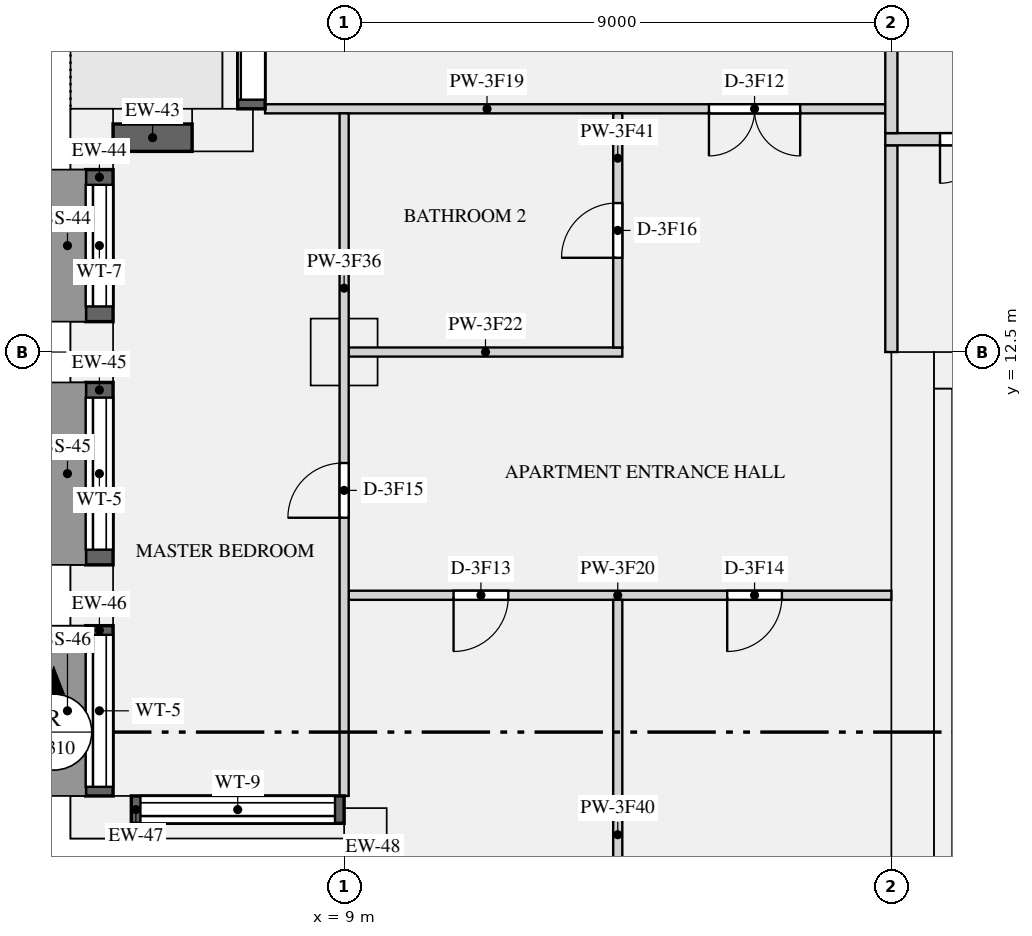
"""IFC4 building model, lengths in metres.
Left out: names, types, materials, properties, quantities, classifications, styles, units other than length and angle.
Written with IfcOpenShell. Run it as: python <this file> out.ifc"""

import sys

from ifc_helpers import new_model, si_unit, direction, frame, frame_2d, origin, origin_2d, place, context, subcontext, project, spatial, rectangle, extrude, element, fill, save


model = new_model("IFC4")
c1 = context("Model", 3, precision=1e-05, world=origin(), true_north=direction((0.0, 1.0)))
c2 = subcontext(c1, "Body", "Model", "MODEL_VIEW")
j1 = project(units=[si_unit("LENGTHUNIT", "METRE"), si_unit("PLANEANGLEUNIT", "RADIAN")], contexts=[c1])
p1 = place(None, origin())
s1 = spatial("IfcSite", under=j1, at=p1, CompositionType="ELEMENT")
p2 = place(p1, origin())
s2 = spatial("IfcBuilding", under=s1, at=p2, CompositionType="ELEMENT")
p3 = place(p2, frame((0.0, 0.0, 182.25)))
s3 = spatial("IfcBuildingStorey", under=s2, at=p3, CompositionType="ELEMENT", Elevation=182.25)
for number, where, z_axis, x_axis in (
    (1, (7.0, 16.15, 0.0), (0.0, 0.0, 1.0), (-1.0, 0.0, 0.0)),
    (2, (4.85, 16.0, 0.0), (0.0, 0.0, 1.0), (0.0, -1.0, 0.0)),
    (3, (4.85, 12.5, 0.0), (0.0, 0.0, 1.0), (0.0, -1.0, 0.0)),
    (4, (4.85, 8.5, 0.0), (0.0, 0.0, 1.0), (0.0, -1.0, 0.0)),
):
    element("IfcColumn", number, at=place(p3, frame(where, z_axis=z_axis, x_axis=x_axis)), inside=s3, PredefinedType="USERDEFINED", context=c2, shape_type="SweptSolid", body=[
        extrude(rectangle(XDim=1.0, YDim=0.7, at=origin_2d()), origin(), (0.0, 0.0, 1.0), 2.65),
    ])
for number, where, z_axis, x_axis in (
    (5, (5.0, 4.85, 0.0), (0.0, 0.0, 1.0), (1.0, 0.0, 0.0)),
    (6, (9.35, 4.5, 0.0), (0.0, 0.0, 1.0), (0.0, -1.0, 0.0)),
):
    element("IfcColumn", number, at=place(p3, frame(where, z_axis=z_axis, x_axis=x_axis)), inside=s3, PredefinedType="USERDEFINED", context=c2, shape_type="SweptSolid", body=[
        extrude(rectangle(XDim=1.0, YDim=0.7, at=origin_2d()), origin(), (0.0, 0.0, 1.0), 3.15),
    ])
p4 = place(p3, frame((9.0, 12.5, 0.0), z_axis=(0.0, 0.0, 1.0), x_axis=(1.0, 0.0, 0.0)))
e7 = element("IfcColumn", 7, at=p4, inside=s3, PredefinedType="COLUMN", context=c2, shape_type="SweptSolid", body=[
    extrude(rectangle(XDim=1.1, YDim=1.1, at=origin_2d()), origin(), (0.0, 0.0, 1.0), 3.15),
])
p5 = place(p3, frame((18.35, 0.0, 0.0), z_axis=(0.0, 0.0, 1.0), x_axis=(0.0, 1.0, 0.0)))
e8 = element("IfcWall", 8, at=p5, inside=s3, PredefinedType="SHEAR", context=c2, shape_type="SweptSolid", body=[
    extrude(rectangle(XDim=12.5, YDim=0.7, at=frame_2d((6.25, 0.0))), origin(), (0.0, 0.0, 1.0), 3.15),
])
p6 = place(p3, frame((18.7, 12.2, 0.0), z_axis=(0.0, 0.0, 1.0), x_axis=(1.0, 0.0, 0.0)))
e9 = element("IfcWall", 9, at=p6, inside=s3, PredefinedType="SHEAR", context=c2, shape_type="SweptSolid", body=[
    extrude(rectangle(XDim=34.6, YDim=0.6, at=frame_2d((17.3, 0.0))), origin(), (0.0, 0.0, 1.0), 3.15),
])
p7 = place(p6, frame((24.475, 0.0, 0.0)))
e10 = element("IfcOpeningElement", 10, at=p7, cuts=e9, PredefinedType="OPENING", context=c2, shape_type="SweptSolid", body=[
    extrude(rectangle(XDim=1.1, YDim=2.1, at=frame_2d((0.55, 1.05))), frame((0.0, 0.31, 0.0), z_axis=(0.0, -1.0, 0.0), x_axis=(1.0, 0.0, 0.0)), (0.0, 0.0, 1.0), 0.62),
])
p8 = place(p6, frame((26.725, 0.0, 0.0)))
e11 = element("IfcOpeningElement", 11, at=p8, cuts=e9, PredefinedType="OPENING", context=c2, shape_type="SweptSolid", body=[
    extrude(rectangle(XDim=1.1, YDim=2.1, at=frame_2d((0.55, 1.05))), frame((0.0, 0.31, 0.0), z_axis=(0.0, -1.0, 0.0), x_axis=(1.0, 0.0, 0.0)), (0.0, 0.0, 1.0), 0.62),
])
p9 = place(p6, frame((28.975, 0.0, 0.0)))
e12 = element("IfcOpeningElement", 12, at=p9, cuts=e9, PredefinedType="OPENING", context=c2, shape_type="SweptSolid", body=[
    extrude(rectangle(XDim=1.1, YDim=2.1, at=frame_2d((0.55, 1.05))), frame((0.0, 0.31, 0.0), z_axis=(0.0, -1.0, 0.0), x_axis=(1.0, 0.0, 0.0)), (0.0, 0.0, 1.0), 0.62),
])
p10 = place(p6, frame((4.85, 0.0, 0.0)))
e13 = element("IfcOpeningElement", 13, at=p10, cuts=e9, PredefinedType="OPENING", context=c2, shape_type="SweptSolid", body=[
    extrude(rectangle(XDim=0.9, YDim=2.1, at=frame_2d((0.45, 1.05))), frame((0.0, 0.31, 0.0), z_axis=(0.0, -1.0, 0.0), x_axis=(1.0, 0.0, 0.0)), (0.0, 0.0, 1.0), 0.62),
])
p11 = place(p6, frame((11.85, 0.0, 0.0)))
e14 = element("IfcOpeningElement", 14, at=p11, cuts=e9, PredefinedType="OPENING", context=c2, shape_type="SweptSolid", body=[
    extrude(rectangle(XDim=0.9, YDim=2.1, at=frame_2d((0.45, 1.05))), frame((0.0, 0.31, 0.0), z_axis=(0.0, -1.0, 0.0), x_axis=(1.0, 0.0, 0.0)), (0.0, 0.0, 1.0), 0.62),
])
p12 = place(p6, frame((18.35, 0.0, 0.0)))
e15 = element("IfcOpeningElement", 15, at=p12, cuts=e9, PredefinedType="OPENING", context=c2, shape_type="SweptSolid", body=[
    extrude(rectangle(XDim=0.9, YDim=2.1, at=frame_2d((0.45, 1.05))), frame((0.0, 0.31, 0.0), z_axis=(0.0, -1.0, 0.0), x_axis=(1.0, 0.0, 0.0)), (0.0, 0.0, 1.0), 0.62),
])
p13 = place(p6, frame((1.45, 0.0, 0.0)))
e16 = element("IfcOpeningElement", 16, at=p13, cuts=e9, PredefinedType="OPENING", context=c2, shape_type="SweptSolid", body=[
    extrude(rectangle(XDim=1.2, YDim=2.1, at=frame_2d((0.6, 1.05))), frame((0.0, 0.31, 0.0), z_axis=(0.0, -1.0, 0.0), x_axis=(1.0, 0.0, 0.0)), (0.0, 0.0, 1.0), 0.62),
])
p14 = place(p6, frame((31.95, 0.0, 0.0)))
e17 = element("IfcOpeningElement", 17, at=p14, cuts=e9, PredefinedType="OPENING", context=c2, shape_type="SweptSolid", body=[
    extrude(rectangle(XDim=1.2, YDim=2.1, at=frame_2d((0.6, 1.05))), frame((0.0, 0.31, 0.0), z_axis=(0.0, -1.0, 0.0), x_axis=(1.0, 0.0, 0.0)), (0.0, 0.0, 1.0), 0.62),
])
p15 = place(p3, frame((18.85, 1.0, 0.0), z_axis=(0.0, 0.0, 1.0), x_axis=(0.0, 1.0, 0.0)))
e18 = element("IfcWall", 18, at=p15, inside=s3, PredefinedType="SHEAR", context=c2, shape_type="SweptSolid", body=[
    extrude(rectangle(XDim=10.9, YDim=0.3, at=frame_2d((5.45, 0.0))), origin(), (0.0, 0.0, 1.0), 3.15),
])
p16 = place(p3, frame((7.475, 20.0, 0.0), z_axis=(0.0, 0.0, 1.0), x_axis=(0.0, -1.0, 0.0)))
e19 = element("IfcWall", 19, at=p16, inside=s3, PredefinedType="SOLIDWALL", context=c2, shape_type="SweptSolid", body=[
    extrude(rectangle(XDim=3.5, YDim=0.45, at=frame_2d((1.75, 0.0))), origin(), (0.0, 0.0, 1.0), 2.65),
])
p17 = place(p16, frame((0.15, 0.0, 0.0)))
e20 = element("IfcOpeningElement", 20, at=p17, cuts=e19, PredefinedType="OPENING", context=c2, shape_type="SweptSolid", body=[
    extrude(rectangle(XDim=3.2, YDim=2.3, at=frame_2d((1.6, 1.15))), frame((0.0, 0.235, 0.0), z_axis=(0.0, -1.0, 0.0), x_axis=(1.0, 0.0, 0.0)), (0.0, 0.0, 1.0), 0.47),
])
p18 = place(p3, frame((6.5, 16.025, 0.9), z_axis=(0.0, 0.0, 1.0), x_axis=(-1.0, 0.0, 0.0)))
e21 = element("IfcWall", 21, at=p18, inside=s3, PredefinedType="SOLIDWALL", context=c2, shape_type="SweptSolid", body=[
    extrude(rectangle(XDim=1.3, YDim=0.45, at=frame_2d((0.65, 0.0))), origin(), (0.0, 0.0, 1.0), 1.75),
])
p19 = place(p3, frame((4.975, 15.5, 0.9), z_axis=(0.0, 0.0, 1.0), x_axis=(0.0, -1.0, 0.0)))
e22 = element("IfcWall", 22, at=p19, inside=s3, PredefinedType="SOLIDWALL", context=c2, shape_type="SweptSolid", body=[
    extrude(rectangle(XDim=2.5, YDim=0.45, at=frame_2d((1.25, 0.0))), origin(), (0.0, 0.0, 1.0), 1.75),
])
p20 = place(p19, frame((0.25, 0.0, 0.15)))
e23 = element("IfcOpeningElement", 23, at=p20, cuts=e22, PredefinedType="OPENING", context=c2, shape_type="SweptSolid", body=[
    extrude(rectangle(XDim=2.0, YDim=1.5, at=frame_2d((1.0, 0.75))), frame((0.0, 0.235, 0.0), z_axis=(0.0, -1.0, 0.0), x_axis=(1.0, 0.0, 0.0)), (0.0, 0.0, 1.0), 0.47),
])
p21 = place(p3, frame((4.975, 12.0, 0.9), z_axis=(0.0, 0.0, 1.0), x_axis=(0.0, -1.0, 0.0)))
e24 = element("IfcWall", 24, at=p21, inside=s3, PredefinedType="SOLIDWALL", context=c2, shape_type="SweptSolid", body=[
    extrude(rectangle(XDim=3.0, YDim=0.45, at=frame_2d((1.5, 0.0))), origin(), (0.0, 0.0, 1.0), 1.75),
])
p22 = place(p21, frame((0.25, 0.0, 0.15)))
e25 = element("IfcOpeningElement", 25, at=p22, cuts=e24, PredefinedType="OPENING", context=c2, shape_type="SweptSolid", body=[
    extrude(rectangle(XDim=2.5, YDim=1.5, at=frame_2d((1.25, 0.75))), frame((0.0, 0.235, 0.0), z_axis=(0.0, -1.0, 0.0), x_axis=(1.0, 0.0, 0.0)), (0.0, 0.0, 1.0), 0.47),
])
p23 = place(p3, frame((4.975, 8.0, 0.9), z_axis=(0.0, 0.0, 1.0), x_axis=(0.0, -1.0, 0.0)))
e26 = element("IfcWall", 26, at=p23, inside=s3, PredefinedType="SOLIDWALL", context=c2, shape_type="SweptSolid", body=[
    extrude(rectangle(XDim=2.8, YDim=0.45, at=frame_2d((1.4, 0.0))), origin(), (0.0, 0.0, 1.0), 1.75),
])
p24 = place(p23, frame((0.15, 0.0, 0.15)))
e27 = element("IfcOpeningElement", 27, at=p24, cuts=e26, PredefinedType="OPENING", context=c2, shape_type="SweptSolid", body=[
    extrude(rectangle(XDim=2.5, YDim=1.5, at=frame_2d((1.25, 0.75))), frame((0.0, 0.235, 0.0), z_axis=(0.0, -1.0, 0.0), x_axis=(1.0, 0.0, 0.0)), (0.0, 0.0, 1.0), 0.47),
])
p25 = place(p3, frame((5.5, 4.975, 0.9), z_axis=(0.0, 0.0, 1.0), x_axis=(1.0, 0.0, 0.0)))
e28 = element("IfcWall", 28, at=p25, inside=s3, PredefinedType="SOLIDWALL", context=c2, shape_type="SweptSolid", body=[
    extrude(rectangle(XDim=3.5, YDim=0.45, at=frame_2d((1.75, 0.0))), origin(), (0.0, 0.0, 1.0), 1.75),
])
p26 = place(p25, frame((0.15, 0.0, 0.15)))
e29 = element("IfcOpeningElement", 29, at=p26, cuts=e28, PredefinedType="OPENING", context=c2, shape_type="SweptSolid", body=[
    extrude(rectangle(XDim=3.2, YDim=1.5, at=frame_2d((1.6, 0.75))), frame((0.0, 0.235, 0.0), z_axis=(0.0, -1.0, 0.0), x_axis=(1.0, 0.0, 0.0)), (0.0, 0.0, 1.0), 0.47),
])
p27 = place(p3, frame((18.0, 12.5, 0.0), z_axis=(0.0, 0.0, 1.0), x_axis=(0.0, 1.0, 0.0)))
e30 = element("IfcWall", 30, at=p27, inside=s3, PredefinedType="PARTITIONING", context=c2, shape_type="SweptSolid", body=[
    extrude(rectangle(XDim=3.4, YDim=0.2, at=frame_2d((1.7, 0.0))), origin(), (0.0, 0.0, 1.0), 2.65),
])
p28 = place(p3, frame((7.7, 16.5, 0.0), z_axis=(0.0, 0.0, 1.0), x_axis=(1.0, 0.0, 0.0)))
e31 = element("IfcWall", 31, at=p28, inside=s3, PredefinedType="PARTITIONING", context=c2, shape_type="SweptSolid", body=[
    extrude(rectangle(XDim=10.2, YDim=0.15, at=frame_2d((5.1, 0.0))), origin(), (0.0, 0.0, 1.0), 2.65),
])
p29 = place(p28, frame((7.3, 0.0, 0.0)))
e32 = element("IfcOpeningElement", 32, at=p29, cuts=e31, PredefinedType="OPENING", context=c2, shape_type="SweptSolid", body=[
    extrude(rectangle(XDim=1.5, YDim=2.1, at=frame_2d((0.75, 1.05))), frame((0.0, 0.085, 0.0), z_axis=(0.0, -1.0, 0.0), x_axis=(1.0, 0.0, 0.0)), (0.0, 0.0, 1.0), 0.17),
])
p30 = place(p3, frame((9.075, 8.5, 0.0), z_axis=(0.0, 0.0, 1.0), x_axis=(1.0, 0.0, 0.0)))
e33 = element("IfcWall", 33, at=p30, inside=s3, PredefinedType="PARTITIONING", context=c2, shape_type="SweptSolid", body=[
    extrude(rectangle(XDim=8.925, YDim=0.15, at=frame_2d((4.462, 0.0))), origin(), (0.0, 0.0, 1.0), 2.65),
])
p31 = place(p30, frame((1.725, 0.0, 0.0)))
e34 = element("IfcOpeningElement", 34, at=p31, cuts=e33, PredefinedType="OPENING", context=c2, shape_type="SweptSolid", body=[
    extrude(rectangle(XDim=0.9, YDim=2.1, at=frame_2d((0.45, 1.05))), frame((0.0, 0.085, 0.0), z_axis=(0.0, -1.0, 0.0), x_axis=(1.0, 0.0, 0.0)), (0.0, 0.0, 1.0), 0.17),
])
p32 = place(p30, frame((6.225, 0.0, 0.0)))
e35 = element("IfcOpeningElement", 35, at=p32, cuts=e33, PredefinedType="OPENING", context=c2, shape_type="SweptSolid", body=[
    extrude(rectangle(XDim=0.9, YDim=2.1, at=frame_2d((0.45, 1.05))), frame((0.0, 0.085, 0.0), z_axis=(0.0, -1.0, 0.0), x_axis=(1.0, 0.0, 0.0)), (0.0, 0.0, 1.0), 0.17),
])
p33 = place(p3, frame((9.075, 12.5, 0.0), z_axis=(0.0, 0.0, 1.0), x_axis=(1.0, 0.0, 0.0)))
e36 = element("IfcWall", 36, at=p33, inside=s3, PredefinedType="PARTITIONING", context=c2, shape_type="SweptSolid", body=[
    extrude(rectangle(XDim=4.5, YDim=0.15, at=frame_2d((2.25, 0.0))), origin(), (0.0, 0.0, 1.0), 2.65),
])
p34 = place(p3, frame((17.9, 16.0, 0.0), z_axis=(0.0, 0.0, 1.0), x_axis=(1.0, 0.0, 0.0)))
e37 = element("IfcWall", 37, at=p34, inside=s3, PredefinedType="PARTITIONING", context=c2, shape_type="SweptSolid", body=[
    extrude(rectangle(XDim=36.2, YDim=0.2, at=frame_2d((18.1, 0.0))), origin(), (0.0, 0.0, 1.0), 2.65),
])
p35 = place(p34, frame((0.9, 0.0, 0.0)))
e38 = element("IfcOpeningElement", 38, at=p35, cuts=e37, PredefinedType="OPENING", context=c2, shape_type="SweptSolid", body=[
    extrude(rectangle(XDim=1.4, YDim=2.1, at=frame_2d((0.7, 1.05))), frame((0.0, 0.11, 0.0), z_axis=(0.0, -1.0, 0.0), x_axis=(1.0, 0.0, 0.0)), (0.0, 0.0, 1.0), 0.22),
])
p36 = place(p34, frame((33.9, 0.0, 0.0)))
e39 = element("IfcOpeningElement", 39, at=p36, cuts=e37, PredefinedType="OPENING", context=c2, shape_type="SweptSolid", body=[
    extrude(rectangle(XDim=1.4, YDim=2.1, at=frame_2d((0.7, 1.05))), frame((0.0, 0.11, 0.0), z_axis=(0.0, -1.0, 0.0), x_axis=(1.0, 0.0, 0.0)), (0.0, 0.0, 1.0), 0.22),
])
p37 = place(p3, frame((18.0, 16.1, 0.0), z_axis=(0.0, 0.0, 1.0), x_axis=(0.0, 1.0, 0.0)))
e40 = element("IfcWall", 40, at=p37, inside=s3, PredefinedType="PARTITIONING", context=c2, shape_type="SweptSolid", body=[
    extrude(rectangle(XDim=7.8, YDim=0.2, at=frame_2d((3.9, 0.0))), origin(), (0.0, 0.0, 1.0), 2.65),
])
p38 = place(p3, frame((9.0, 5.2, 0.0), z_axis=(0.0, 0.0, 1.0), x_axis=(0.0, 1.0, 0.0)))
e41 = element("IfcWall", 41, at=p38, inside=s3, PredefinedType="PARTITIONING", context=c2, shape_type="SweptSolid", body=[
    extrude(rectangle(XDim=11.225, YDim=0.15, at=frame_2d((5.613, 0.0))), origin(), (0.0, 0.0, 1.0), 2.65),
])
p39 = place(p38, frame((4.575, 0.0, 0.0)))
e42 = element("IfcOpeningElement", 42, at=p39, cuts=e41, PredefinedType="OPENING", context=c2, shape_type="SweptSolid", body=[
    extrude(rectangle(XDim=0.9, YDim=2.1, at=frame_2d((0.45, 1.05))), frame((0.0, 0.085, 0.0), z_axis=(0.0, -1.0, 0.0), x_axis=(1.0, 0.0, 0.0)), (0.0, 0.0, 1.0), 0.17),
])
p40 = place(p3, frame((13.5, 0.7, 0.0), z_axis=(0.0, 0.0, 1.0), x_axis=(0.0, 1.0, 0.0)))
e43 = element("IfcWall", 43, at=p40, inside=s3, PredefinedType="PARTITIONING", context=c2, shape_type="SweptSolid", body=[
    extrude(rectangle(XDim=7.725, YDim=0.15, at=frame_2d((3.863, 0.0))), origin(), (0.0, 0.0, 1.0), 2.65),
])
p41 = place(p3, frame((13.5, 12.575, 0.0), z_axis=(0.0, 0.0, 1.0), x_axis=(0.0, 1.0, 0.0)))
e44 = element("IfcWall", 44, at=p41, inside=s3, PredefinedType="PARTITIONING", context=c2, shape_type="SweptSolid", body=[
    extrude(rectangle(XDim=3.85, YDim=0.15, at=frame_2d((1.925, 0.0))), origin(), (0.0, 0.0, 1.0), 2.65),
])
p42 = place(p41, frame((1.475, 0.0, 0.0)))
e45 = element("IfcOpeningElement", 45, at=p42, cuts=e44, PredefinedType="OPENING", context=c2, shape_type="SweptSolid", body=[
    extrude(rectangle(XDim=0.9, YDim=2.1, at=frame_2d((0.45, 1.05))), frame((0.0, 0.085, 0.0), z_axis=(0.0, -1.0, 0.0), x_axis=(1.0, 0.0, 0.0)), (0.0, 0.0, 1.0), 0.17),
])
p43 = place(p17, origin())
e46 = element("IfcDoor", 46, at=p43, inside=s3, OperationType="SLIDING_TO_LEFT", PredefinedType="DOOR", context=c2, shape_type="SweptSolid", body=[
    extrude(rectangle(XDim=3.2, YDim=2.3, at=frame_2d((1.6, 1.15))), frame((0.0, -0.07, 0.0), z_axis=(0.0, -1.0, 0.0), x_axis=(1.0, 0.0, 0.0)), (0.0, 0.0, 1.0), 0.05),
])
fill(e20, e46)
p44 = place(p20, origin())
e47 = element("IfcWindow", 47, at=p44, inside=s3, PartitioningType="SINGLE_PANEL", PredefinedType="WINDOW", context=c2, shape_type="SweptSolid", body=[
    extrude(rectangle(XDim=2.0, YDim=1.5, at=frame_2d((1.0, 0.75))), frame((0.0, -0.065, 0.0), z_axis=(0.0, -1.0, 0.0), x_axis=(1.0, 0.0, 0.0)), (0.0, 0.0, 1.0), 0.06),
])
fill(e23, e47)
p45 = place(p22, origin())
e48 = element("IfcWindow", 48, at=p45, inside=s3, PartitioningType="SINGLE_PANEL", PredefinedType="WINDOW", context=c2, shape_type="SweptSolid", body=[
    extrude(rectangle(XDim=2.5, YDim=1.5, at=frame_2d((1.25, 0.75))), frame((0.0, -0.065, 0.0), z_axis=(0.0, -1.0, 0.0), x_axis=(1.0, 0.0, 0.0)), (0.0, 0.0, 1.0), 0.06),
])
fill(e25, e48)
p46 = place(p24, origin())
e49 = element("IfcWindow", 49, at=p46, inside=s3, PartitioningType="SINGLE_PANEL", PredefinedType="WINDOW", context=c2, shape_type="SweptSolid", body=[
    extrude(rectangle(XDim=2.5, YDim=1.5, at=frame_2d((1.25, 0.75))), frame((0.0, -0.065, 0.0), z_axis=(0.0, -1.0, 0.0), x_axis=(1.0, 0.0, 0.0)), (0.0, 0.0, 1.0), 0.06),
])
fill(e27, e49)
p47 = place(p26, origin())
e50 = element("IfcWindow", 50, at=p47, inside=s3, PartitioningType="SINGLE_PANEL", PredefinedType="WINDOW", context=c2, shape_type="SweptSolid", body=[
    extrude(rectangle(XDim=3.2, YDim=1.5, at=frame_2d((1.6, 0.75))), frame((0.0, -0.065, 0.0), z_axis=(0.0, -1.0, 0.0), x_axis=(1.0, 0.0, 0.0)), (0.0, 0.0, 1.0), 0.06),
])
fill(e29, e50)
p48 = place(p35, frame((1.4, 0.0, 0.0), z_axis=(0.0, 0.0, 1.0), x_axis=(-1.0, 0.0, 0.0)))
e51 = element("IfcDoor", 51, at=p48, inside=s3, OperationType="DOUBLE_DOOR_SINGLE_SWING", PredefinedType="DOOR", context=c2, shape_type="SweptSolid", body=[
    extrude(rectangle(XDim=1.4, YDim=2.1, at=frame_2d((0.7, 1.05))), frame((0.0, 0.025, 0.0), z_axis=(0.0, -1.0, 0.0), x_axis=(1.0, 0.0, 0.0)), (0.0, 0.0, 1.0), 0.05),
])
fill(e38, e51)
p49 = place(p29, frame((1.5, 0.0, 0.0), z_axis=(0.0, 0.0, 1.0), x_axis=(-1.0, 0.0, 0.0)))
e52 = element("IfcDoor", 52, at=p49, inside=s3, OperationType="DOUBLE_DOOR_SINGLE_SWING", PredefinedType="DOOR", context=c2, shape_type="SweptSolid", body=[
    extrude(rectangle(XDim=1.5, YDim=2.1, at=frame_2d((0.75, 1.05))), frame((0.0, 0.025, 0.0), z_axis=(0.0, -1.0, 0.0), x_axis=(1.0, 0.0, 0.0)), (0.0, 0.0, 1.0), 0.05),
])
fill(e32, e52)
p50 = place(p31, frame((0.9, 0.0, 0.0), z_axis=(0.0, 0.0, 1.0), x_axis=(-1.0, 0.0, 0.0)))
e53 = element("IfcDoor", 53, at=p50, inside=s3, OperationType="SINGLE_SWING_RIGHT", PredefinedType="DOOR", context=c2, shape_type="SweptSolid", body=[
    extrude(rectangle(XDim=0.9, YDim=2.1, at=frame_2d((0.45, 1.05))), frame((0.0, 0.025, 0.0), z_axis=(0.0, -1.0, 0.0), x_axis=(1.0, 0.0, 0.0)), (0.0, 0.0, 1.0), 0.05),
])
fill(e34, e53)
p51 = place(p32, frame((0.9, 0.0, 0.0), z_axis=(0.0, 0.0, 1.0), x_axis=(-1.0, 0.0, 0.0)))
e54 = element("IfcDoor", 54, at=p51, inside=s3, OperationType="SINGLE_SWING_RIGHT", PredefinedType="DOOR", context=c2, shape_type="SweptSolid", body=[
    extrude(rectangle(XDim=0.9, YDim=2.1, at=frame_2d((0.45, 1.05))), frame((0.0, 0.025, 0.0), z_axis=(0.0, -1.0, 0.0), x_axis=(1.0, 0.0, 0.0)), (0.0, 0.0, 1.0), 0.05),
])
fill(e35, e54)
p52 = place(p39, origin())
e55 = element("IfcDoor", 55, at=p52, inside=s3, OperationType="SINGLE_SWING_LEFT", PredefinedType="DOOR", context=c2, shape_type="SweptSolid", body=[
    extrude(rectangle(XDim=0.9, YDim=2.1, at=frame_2d((0.45, 1.05))), frame((0.0, 0.025, 0.0), z_axis=(0.0, -1.0, 0.0), x_axis=(1.0, 0.0, 0.0)), (0.0, 0.0, 1.0), 0.05),
])
fill(e42, e55)
p53 = place(p42, origin())
e56 = element("IfcDoor", 56, at=p53, inside=s3, OperationType="SINGLE_SWING_LEFT", PredefinedType="DOOR", context=c2, shape_type="SweptSolid", body=[
    extrude(rectangle(XDim=0.9, YDim=2.1, at=frame_2d((0.45, 1.05))), frame((0.0, 0.025, 0.0), z_axis=(0.0, -1.0, 0.0), x_axis=(1.0, 0.0, 0.0)), (0.0, 0.0, 1.0), 0.05),
])
fill(e45, e56)
save(model, sys.argv[1])
